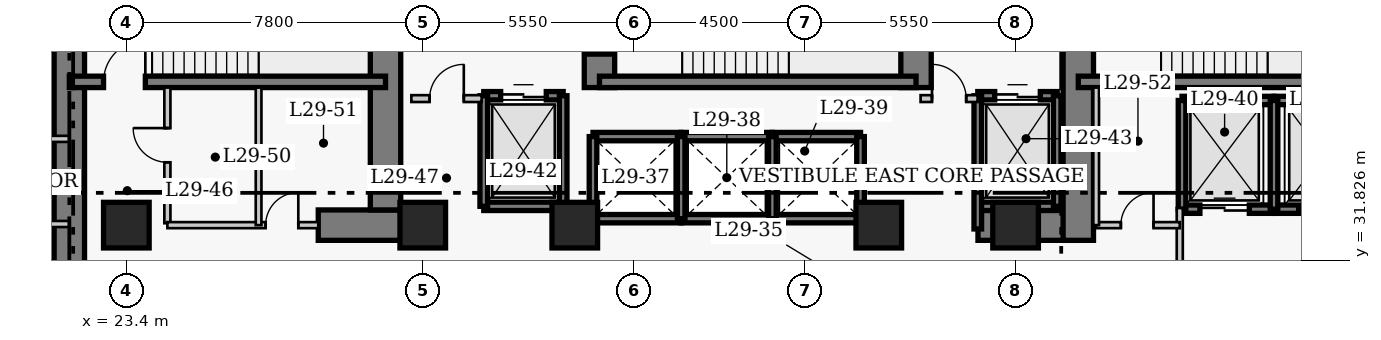
"""IFC4 building model, lengths in metres.
Left out: names, types, materials, properties, quantities, classifications, styles, units other than length and angle.
Written with IfcOpenShell. Run it as: python <this file> out.ifc"""

import sys

from ifc_helpers import new_model, si_unit, direction, frame, frame_2d, origin, origin_2d, place, context, subcontext, project, spatial, rectangle, extrude, element, fill, save


model = new_model("IFC4")
c1 = context("Model", 3, precision=1e-05, world=origin(), true_north=direction((0.0, 1.0)))
c2 = subcontext(c1, "Body", "Model", "MODEL_VIEW")
j1 = project(units=[si_unit("LENGTHUNIT", "METRE"), si_unit("PLANEANGLEUNIT", "RADIAN")], contexts=[c1])
p1 = place(None, origin())
s1 = spatial("IfcSite", under=j1, at=p1, CompositionType="ELEMENT")
p2 = place(p1, origin())
s2 = spatial("IfcBuilding", under=s1, at=p2, CompositionType="ELEMENT")
p3 = place(p2, frame((0.0, 0.0, 118.4)))
s3 = spatial("IfcBuildingStorey", under=s2, at=p3, CompositionType="ELEMENT", Elevation=118.4)
p4 = place(p3, frame((21.9, 27.05, 0.0), z_axis=(0.0, 0.0, 1.0), x_axis=(0.0, 1.0, 0.0)))
e1 = element("IfcWall", 1, at=p4, inside=s3, PredefinedType="SHEAR", context=c2, shape_type="SweptSolid", body=[
    extrude(rectangle(XDim=13.67, YDim=0.8, at=frame_2d((6.835, 0.0))), origin(), (0.0, 0.0, 1.0), 3.8),
])
p5 = place(p3, frame((28.45, 32.75, 0.0), z_axis=(0.0, 0.0, 1.0), x_axis=(1.0, 0.0, 0.0)))
e2 = element("IfcWall", 2, at=p5, inside=s3, PredefinedType="SHEAR", context=c2, shape_type="SweptSolid", body=[
    extrude(rectangle(XDim=2.4, YDim=0.8, at=frame_2d((1.2, 0.0))), origin(), (0.0, 0.0, 1.0), 3.8),
])
p6 = place(p3, frame((45.81, 32.75, 0.0), z_axis=(0.0, 0.0, 1.0), x_axis=(1.0, 0.0, 0.0)))
e3 = element("IfcWall", 3, at=p6, inside=s3, PredefinedType="SHEAR", context=c2, shape_type="SweptSolid", body=[
    extrude(rectangle(XDim=2.64, YDim=0.8, at=frame_2d((1.32, 0.0))), origin(), (0.0, 0.0, 1.0), 3.8),
])
p7 = place(p3, frame((30.22, 33.15, 0.0), z_axis=(0.0, 0.0, 1.0), x_axis=(0.0, 1.0, 0.0)))
e4 = element("IfcWall", 4, at=p7, inside=s3, PredefinedType="SHEAR", context=c2, shape_type="SweptSolid", body=[
    extrude(rectangle(XDim=7.17, YDim=0.8, at=frame_2d((3.585, 0.0))), origin(), (0.0, 0.0, 1.0), 3.8),
])
p8 = place(p3, frame((35.85, 36.37, 0.0), z_axis=(0.0, 0.0, 1.0), x_axis=(0.0, 1.0, 0.0)))
e5 = element("IfcWall", 5, at=p8, inside=s3, PredefinedType="SHEAR", context=c2, shape_type="SweptSolid", body=[
    extrude(rectangle(XDim=3.95, YDim=0.8, at=frame_2d((1.975, 0.0))), origin(), (0.0, 0.0, 1.0), 3.8),
])
p9 = place(p8, frame((0.88, 0.0, 0.0)))
e6 = element("IfcOpeningElement", 6, at=p9, cuts=e5, PredefinedType="OPENING", context=c2, shape_type="SweptSolid", body=[
    extrude(rectangle(XDim=1.1, YDim=2.15, at=frame_2d((0.55, 1.075))), frame((0.0, 0.41, 0.0), z_axis=(0.0, -1.0, 0.0), x_axis=(1.0, 0.0, 0.0)), (0.0, 0.0, 1.0), 0.82),
])
p10 = place(p3, frame((44.18, 36.37, 0.0), z_axis=(0.0, 0.0, 1.0), x_axis=(0.0, 1.0, 0.0)))
e7 = element("IfcWall", 7, at=p10, inside=s3, PredefinedType="SHEAR", context=c2, shape_type="SweptSolid", body=[
    extrude(rectangle(XDim=3.95, YDim=0.8, at=frame_2d((1.975, 0.0))), origin(), (0.0, 0.0, 1.0), 3.8),
])
p11 = place(p3, frame((48.45, 32.35, 0.0), z_axis=(0.0, 0.0, 1.0), x_axis=(0.0, 1.0, 0.0)))
e8 = element("IfcWall", 8, at=p11, inside=s3, PredefinedType="SHEAR", context=c2, shape_type="SweptSolid", body=[
    extrude(rectangle(XDim=7.97, YDim=0.8, at=frame_2d((3.985, 0.0))), origin(), (0.0, 0.0, 1.0), 3.8),
])
p12 = place(p11, frame((5.85, 0.0, 0.0)))
e9 = element("IfcOpeningElement", 9, at=p12, cuts=e8, PredefinedType="OPENING", context=c2, shape_type="SweptSolid", body=[
    extrude(rectangle(XDim=1.1, YDim=2.15, at=frame_2d((0.55, 1.075))), frame((0.0, 0.41, 0.0), z_axis=(0.0, -1.0, 0.0), x_axis=(1.0, 0.0, 0.0)), (0.0, 0.0, 1.0), 0.82),
])
p13 = place(p3, frame((21.9, 36.52, 0.0), z_axis=(0.0, 0.0, 1.0), x_axis=(1.0, 0.0, 0.0)))
e10 = element("IfcWall", 10, at=p13, inside=s3, PredefinedType="SHEAR", context=c2, shape_type="SweptSolid", body=[
    extrude(rectangle(XDim=8.32, YDim=0.3, at=frame_2d((4.16, 0.0))), origin(), (0.0, 0.0, 1.0), 3.8),
])
p14 = place(p13, frame((0.9, 0.0, 0.0)))
e11 = element("IfcOpeningElement", 11, at=p14, cuts=e10, PredefinedType="OPENING", context=c2, shape_type="SweptSolid", body=[
    extrude(rectangle(XDim=1.1, YDim=2.15, at=frame_2d((0.55, 1.075))), frame((0.0, 0.16, 0.0), z_axis=(0.0, -1.0, 0.0), x_axis=(1.0, 0.0, 0.0)), (0.0, 0.0, 1.0), 0.32),
])
p15 = place(p3, frame((35.85, 36.52, 0.0), z_axis=(0.0, 0.0, 1.0), x_axis=(1.0, 0.0, 0.0)))
e12 = element("IfcWall", 12, at=p15, inside=s3, PredefinedType="SHEAR", context=c2, shape_type="SweptSolid", body=[
    extrude(rectangle(XDim=8.33, YDim=0.3, at=frame_2d((4.165, 0.0))), origin(), (0.0, 0.0, 1.0), 3.8),
])
p16 = place(p3, frame((48.45, 36.52, 0.0), z_axis=(0.0, 0.0, 1.0), x_axis=(1.0, 0.0, 0.0)))
e13 = element("IfcWall", 13, at=p16, inside=s3, PredefinedType="SHEAR", context=c2, shape_type="SweptSolid", body=[
    extrude(rectangle(XDim=8.47, YDim=0.3, at=frame_2d((4.235, 0.0))), origin(), (0.0, 0.0, 1.0), 3.8),
])
for number, where, z_axis, x_axis in (
    (14, (23.4, 32.75, 0.0), (0.0, 0.0, 1.0), (1.0, 0.0, 0.0)),
    (15, (31.2, 32.75, 0.0), (0.0, 0.0, 1.0), (1.0, 0.0, 0.0)),
    (16, (35.2, 32.75, 0.0), (0.0, 0.0, 1.0), (1.0, 0.0, 0.0)),
    (17, (43.2, 32.75, 0.0), (0.0, 0.0, 1.0), (1.0, 0.0, 0.0)),
    (18, (46.8, 32.75, 0.0), (0.0, 0.0, 1.0), (1.0, 0.0, 0.0)),
):
    element("IfcColumn", number, at=place(p3, frame(where, z_axis=z_axis, x_axis=x_axis)), inside=s3, PredefinedType="COLUMN", context=c2, shape_type="SweptSolid", body=[
        extrude(rectangle(XDim=1.2, YDim=1.2, at=origin_2d()), origin(), (0.0, 0.0, 1.0), 3.8),
    ])
for number, where, z_axis, x_axis in (
    (19, (35.68, 35.08, 0.0), (0.0, 0.0, 1.0), (1.0, 0.0, 0.0)),
    (20, (35.68, 32.92, 0.0), (0.0, 0.0, 1.0), (1.0, 0.0, 0.0)),
):
    element("IfcWall", number, at=place(p3, frame(where, z_axis=z_axis, x_axis=x_axis)), inside=s3, PredefinedType="SHEAR", context=c2, shape_type="SweptSolid", body=[
        extrude(rectangle(XDim=2.32, YDim=0.22, at=frame_2d((1.16, 0.0))), origin(), (0.0, 0.0, 1.0), 3.8),
    ])
p17 = place(p3, frame((35.68, 32.92, 0.0), z_axis=(0.0, 0.0, 1.0), x_axis=(0.0, 1.0, 0.0)))
e21 = element("IfcWall", 21, at=p17, inside=s3, PredefinedType="SHEAR", context=c2, shape_type="SweptSolid", body=[
    extrude(rectangle(XDim=2.16, YDim=0.2, at=frame_2d((1.08, 0.0))), origin(), (0.0, 0.0, 1.0), 3.8),
])
for number, where, z_axis, x_axis in (
    (22, (38.0, 35.08, 0.0), (0.0, 0.0, 1.0), (1.0, 0.0, 0.0)),
    (23, (38.0, 32.92, 0.0), (0.0, 0.0, 1.0), (1.0, 0.0, 0.0)),
):
    element("IfcWall", number, at=place(p3, frame(where, z_axis=z_axis, x_axis=x_axis)), inside=s3, PredefinedType="SHEAR", context=c2, shape_type="SweptSolid", body=[
        extrude(rectangle(XDim=2.4, YDim=0.22, at=frame_2d((1.2, 0.0))), origin(), (0.0, 0.0, 1.0), 3.8),
    ])
p18 = place(p3, frame((38.0, 32.92, 0.0), z_axis=(0.0, 0.0, 1.0), x_axis=(0.0, 1.0, 0.0)))
e24 = element("IfcWall", 24, at=p18, inside=s3, PredefinedType="SHEAR", context=c2, shape_type="SweptSolid", body=[
    extrude(rectangle(XDim=2.16, YDim=0.2, at=frame_2d((1.08, 0.0))), origin(), (0.0, 0.0, 1.0), 3.8),
])
for number, where, z_axis, x_axis in (
    (25, (40.4, 35.08, 0.0), (0.0, 0.0, 1.0), (1.0, 0.0, 0.0)),
    (26, (40.4, 32.92, 0.0), (0.0, 0.0, 1.0), (1.0, 0.0, 0.0)),
):
    element("IfcWall", number, at=place(p3, frame(where, z_axis=z_axis, x_axis=x_axis)), inside=s3, PredefinedType="SHEAR", context=c2, shape_type="SweptSolid", body=[
        extrude(rectangle(XDim=2.32, YDim=0.22, at=frame_2d((1.16, 0.0))), origin(), (0.0, 0.0, 1.0), 3.8),
    ])
for number, where, z_axis, x_axis in (
    (27, (40.4, 32.92, 0.0), (0.0, 0.0, 1.0), (0.0, 1.0, 0.0)),
    (28, (42.72, 32.92, 0.0), (0.0, 0.0, 1.0), (0.0, 1.0, 0.0)),
):
    element("IfcWall", number, at=place(p3, frame(where, z_axis=z_axis, x_axis=x_axis)), inside=s3, PredefinedType="SHEAR", context=c2, shape_type="SweptSolid", body=[
        extrude(rectangle(XDim=2.16, YDim=0.2, at=frame_2d((1.08, 0.0))), origin(), (0.0, 0.0, 1.0), 3.8),
    ])
p19 = place(p3, frame((51.18, 36.03, 0.0), z_axis=(0.0, 0.0, 1.0), x_axis=(1.0, 0.0, 0.0)))
e29 = element("IfcWall", 29, at=p19, inside=s3, PredefinedType="SHEAR", context=c2, shape_type="SweptSolid", body=[
    extrude(rectangle(XDim=2.42, YDim=0.22, at=frame_2d((1.21, 0.0))), origin(), (0.0, 0.0, 1.0), 3.8),
])
p20 = place(p3, frame((51.18, 33.17, 0.0), z_axis=(0.0, 0.0, 1.0), x_axis=(1.0, 0.0, 0.0)))
e30 = element("IfcWall", 30, at=p20, inside=s3, PredefinedType="SHEAR", context=c2, shape_type="SweptSolid", body=[
    extrude(rectangle(XDim=2.42, YDim=0.22, at=frame_2d((1.21, 0.0))), origin(), (0.0, 0.0, 1.0), 3.8),
])
p21 = place(p20, frame((0.47, 0.0, 0.0)))
e31 = element("IfcOpeningElement", 31, at=p21, cuts=e30, PredefinedType="OPENING", context=c2, shape_type="SweptSolid", body=[
    extrude(rectangle(XDim=1.3, YDim=2.15, at=frame_2d((0.65, 1.075))), frame((0.0, 0.12, 0.0), z_axis=(0.0, -1.0, 0.0), x_axis=(1.0, 0.0, 0.0)), (0.0, 0.0, 1.0), 0.24),
])
p22 = place(p3, frame((51.18, 33.17, 0.0), z_axis=(0.0, 0.0, 1.0), x_axis=(0.0, 1.0, 0.0)))
e32 = element("IfcWall", 32, at=p22, inside=s3, PredefinedType="SHEAR", context=c2, shape_type="SweptSolid", body=[
    extrude(rectangle(XDim=2.86, YDim=0.2, at=frame_2d((1.43, 0.0))), origin(), (0.0, 0.0, 1.0), 3.8),
])
p23 = place(p3, frame((53.6, 36.03, 0.0), z_axis=(0.0, 0.0, 1.0), x_axis=(1.0, 0.0, 0.0)))
e33 = element("IfcWall", 33, at=p23, inside=s3, PredefinedType="SHEAR", context=c2, shape_type="SweptSolid", body=[
    extrude(rectangle(XDim=2.42, YDim=0.22, at=frame_2d((1.21, 0.0))), origin(), (0.0, 0.0, 1.0), 3.8),
])
p24 = place(p3, frame((53.6, 33.17, 0.0), z_axis=(0.0, 0.0, 1.0), x_axis=(1.0, 0.0, 0.0)))
e34 = element("IfcWall", 34, at=p24, inside=s3, PredefinedType="SHEAR", context=c2, shape_type="SweptSolid", body=[
    extrude(rectangle(XDim=2.42, YDim=0.22, at=frame_2d((1.21, 0.0))), origin(), (0.0, 0.0, 1.0), 3.8),
])
p25 = place(p24, frame((0.65, 0.0, 0.0)))
e35 = element("IfcOpeningElement", 35, at=p25, cuts=e34, PredefinedType="OPENING", context=c2, shape_type="SweptSolid", body=[
    extrude(rectangle(XDim=1.3, YDim=2.15, at=frame_2d((0.65, 1.075))), frame((0.0, 0.12, 0.0), z_axis=(0.0, -1.0, 0.0), x_axis=(1.0, 0.0, 0.0)), (0.0, 0.0, 1.0), 0.24),
])
p26 = place(p3, frame((53.6, 33.17, 0.0), z_axis=(0.0, 0.0, 1.0), x_axis=(0.0, 1.0, 0.0)))
e36 = element("IfcWall", 36, at=p26, inside=s3, PredefinedType="SHEAR", context=c2, shape_type="SweptSolid", body=[
    extrude(rectangle(XDim=2.86, YDim=0.2, at=frame_2d((1.43, 0.0))), origin(), (0.0, 0.0, 1.0), 3.8),
])
p27 = place(p3, frame((32.805, 36.155, 0.0), z_axis=(0.0, 0.0, 1.0), x_axis=(1.0, 0.0, 0.0)))
e37 = element("IfcWall", 37, at=p27, inside=s3, PredefinedType="SHEAR", context=c2, shape_type="SweptSolid", body=[
    extrude(rectangle(XDim=2.09, YDim=0.22, at=frame_2d((1.045, 0.0))), origin(), (0.0, 0.0, 1.0), 3.8),
])
p28 = place(p27, frame((0.445, 0.0, 0.0)))
e38 = element("IfcOpeningElement", 38, at=p28, cuts=e37, PredefinedType="OPENING", context=c2, shape_type="SweptSolid", body=[
    extrude(rectangle(XDim=1.2, YDim=2.15, at=frame_2d((0.6, 1.075))), frame((0.0, 0.12, 0.0), z_axis=(0.0, -1.0, 0.0), x_axis=(1.0, 0.0, 0.0)), (0.0, 0.0, 1.0), 0.24),
])
p29 = place(p3, frame((32.805, 33.245, 0.0), z_axis=(0.0, 0.0, 1.0), x_axis=(1.0, 0.0, 0.0)))
e39 = element("IfcWall", 39, at=p29, inside=s3, PredefinedType="SHEAR", context=c2, shape_type="SweptSolid", body=[
    extrude(rectangle(XDim=2.09, YDim=0.22, at=frame_2d((1.045, 0.0))), origin(), (0.0, 0.0, 1.0), 3.8),
])
for number, where, z_axis, x_axis in (
    (40, (32.805, 33.245, 0.0), (0.0, 0.0, 1.0), (0.0, 1.0, 0.0)),
    (41, (34.895, 33.245, 0.0), (0.0, 0.0, 1.0), (0.0, 1.0, 0.0)),
):
    element("IfcWall", number, at=place(p3, frame(where, z_axis=z_axis, x_axis=x_axis)), inside=s3, PredefinedType="SHEAR", context=c2, shape_type="SweptSolid", body=[
        extrude(rectangle(XDim=2.91, YDim=0.2, at=frame_2d((1.455, 0.0))), origin(), (0.0, 0.0, 1.0), 3.8),
    ])
p30 = place(p3, frame((45.805, 36.155, 0.0), z_axis=(0.0, 0.0, 1.0), x_axis=(1.0, 0.0, 0.0)))
e42 = element("IfcWall", 42, at=p30, inside=s3, PredefinedType="SHEAR", context=c2, shape_type="SweptSolid", body=[
    extrude(rectangle(XDim=2.09, YDim=0.22, at=frame_2d((1.045, 0.0))), origin(), (0.0, 0.0, 1.0), 3.8),
])
p31 = place(p30, frame((0.445, 0.0, 0.0)))
e43 = element("IfcOpeningElement", 43, at=p31, cuts=e42, PredefinedType="OPENING", context=c2, shape_type="SweptSolid", body=[
    extrude(rectangle(XDim=1.2, YDim=2.15, at=frame_2d((0.6, 1.075))), frame((0.0, 0.12, 0.0), z_axis=(0.0, -1.0, 0.0), x_axis=(1.0, 0.0, 0.0)), (0.0, 0.0, 1.0), 0.24),
])
p32 = place(p3, frame((45.805, 33.245, 0.0), z_axis=(0.0, 0.0, 1.0), x_axis=(1.0, 0.0, 0.0)))
e44 = element("IfcWall", 44, at=p32, inside=s3, PredefinedType="SHEAR", context=c2, shape_type="SweptSolid", body=[
    extrude(rectangle(XDim=2.09, YDim=0.22, at=frame_2d((1.045, 0.0))), origin(), (0.0, 0.0, 1.0), 3.8),
])
p33 = place(p3, frame((45.805, 32.65, 0.0), z_axis=(0.0, 0.0, 1.0), x_axis=(0.0, 1.0, 0.0)))
e45 = element("IfcWall", 45, at=p33, inside=s3, PredefinedType="SHEAR", context=c2, shape_type="SweptSolid", body=[
    extrude(rectangle(XDim=3.505, YDim=0.2, at=frame_2d((1.752, 0.0))), origin(), (0.0, 0.0, 1.0), 3.8),
])
p34 = place(p3, frame((47.895, 33.245, 0.0), z_axis=(0.0, 0.0, 1.0), x_axis=(0.0, 1.0, 0.0)))
e46 = element("IfcWall", 46, at=p34, inside=s3, PredefinedType="SHEAR", context=c2, shape_type="SweptSolid", body=[
    extrude(rectangle(XDim=2.91, YDim=0.2, at=frame_2d((1.455, 0.0))), origin(), (0.0, 0.0, 1.0), 3.8),
])
p35 = place(p3, frame((30.9, 36.08, 0.0), z_axis=(0.0, 0.0, 1.0), x_axis=(1.0, 0.0, 0.0)))
e47 = element("IfcWall", 47, at=p35, inside=s3, PredefinedType="PARTITIONING", context=c2, shape_type="SweptSolid", body=[
    extrude(rectangle(XDim=1.85, YDim=0.18, at=frame_2d((0.925, 0.0))), origin(), (0.0, 0.0, 1.0), 3.54),
])
p36 = place(p35, frame((0.48, 0.0, 0.0)))
e48 = element("IfcOpeningElement", 48, at=p36, cuts=e47, PredefinedType="OPENING", context=c2, shape_type="SweptSolid", body=[
    extrude(rectangle(XDim=0.9, YDim=2.15, at=frame_2d((0.45, 1.075))), frame((0.0, 0.1, 0.0), z_axis=(0.0, -1.0, 0.0), x_axis=(1.0, 0.0, 0.0)), (0.0, 0.0, 1.0), 0.2),
])
p37 = place(p3, frame((44.3, 36.08, 0.0), z_axis=(0.0, 0.0, 1.0), x_axis=(1.0, 0.0, 0.0)))
e49 = element("IfcWall", 49, at=p37, inside=s3, PredefinedType="PARTITIONING", context=c2, shape_type="SweptSolid", body=[
    extrude(rectangle(XDim=1.5, YDim=0.18, at=frame_2d((0.75, 0.0))), origin(), (0.0, 0.0, 1.0), 3.54),
])
p38 = place(p37, frame((0.3, 0.0, 0.0)))
e50 = element("IfcOpeningElement", 50, at=p38, cuts=e49, PredefinedType="OPENING", context=c2, shape_type="SweptSolid", body=[
    extrude(rectangle(XDim=0.9, YDim=2.15, at=frame_2d((0.45, 1.075))), frame((0.0, 0.1, 0.0), z_axis=(0.0, -1.0, 0.0), x_axis=(1.0, 0.0, 0.0)), (0.0, 0.0, 1.0), 0.2),
])
p39 = place(p3, frame((24.48, 32.8, 0.0), z_axis=(0.0, 0.0, 1.0), x_axis=(0.0, 1.0, 0.0)))
e51 = element("IfcWall", 51, at=p39, inside=s3, PredefinedType="PARTITIONING", context=c2, shape_type="SweptSolid", body=[
    extrude(rectangle(XDim=3.57, YDim=0.16, at=frame_2d((1.785, 0.0))), origin(), (0.0, 0.0, 1.0), 3.54),
])
p40 = place(p39, frame((1.604, 0.0, 0.0)))
e52 = element("IfcOpeningElement", 52, at=p40, cuts=e51, PredefinedType="OPENING", context=c2, shape_type="SweptSolid", body=[
    extrude(rectangle(XDim=0.9, YDim=2.1, at=frame_2d((0.45, 1.05))), frame((0.0, 0.09, 0.0), z_axis=(0.0, -1.0, 0.0), x_axis=(1.0, 0.0, 0.0)), (0.0, 0.0, 1.0), 0.18),
])
p41 = place(p3, frame((51.12, 29.5, 0.0), z_axis=(0.0, 0.0, 1.0), x_axis=(0.0, 1.0, 0.0)))
e53 = element("IfcWall", 53, at=p41, inside=s3, PredefinedType="PARTITIONING", context=c2, shape_type="SweptSolid", body=[
    extrude(rectangle(XDim=3.7, YDim=0.16, at=frame_2d((1.85, 0.0))), origin(), (0.0, 0.0, 1.0), 3.54),
])
p42 = place(p41, frame((0.9, 0.0, 0.0)))
e54 = element("IfcOpeningElement", 54, at=p42, cuts=e53, PredefinedType="OPENING", context=c2, shape_type="SweptSolid", body=[
    extrude(rectangle(XDim=1.1, YDim=2.15, at=frame_2d((0.55, 1.075))), frame((0.0, 0.09, 0.0), z_axis=(0.0, -1.0, 0.0), x_axis=(1.0, 0.0, 0.0)), (0.0, 0.0, 1.0), 0.18),
])
p43 = place(p3, frame((24.48, 32.75, 0.0), z_axis=(0.0, 0.0, 1.0), x_axis=(1.0, 0.0, 0.0)))
e55 = element("IfcWall", 55, at=p43, inside=s3, PredefinedType="PARTITIONING", context=c2, shape_type="SweptSolid", body=[
    extrude(rectangle(XDim=3.97, YDim=0.16, at=frame_2d((1.985, 0.0))), origin(), (0.0, 0.0, 1.0), 3.54),
])
p44 = place(p43, frame((2.585, 0.0, 0.0)))
e56 = element("IfcOpeningElement", 56, at=p44, cuts=e55, PredefinedType="OPENING", context=c2, shape_type="SweptSolid", body=[
    extrude(rectangle(XDim=0.86, YDim=2.05, at=frame_2d((0.43, 1.025))), frame((0.0, 0.09, 0.0), z_axis=(0.0, -1.0, 0.0), x_axis=(1.0, 0.0, 0.0)), (0.0, 0.0, 1.0), 0.18),
])
p45 = place(p3, frame((48.92, 32.75, 0.0), z_axis=(0.0, 0.0, 1.0), x_axis=(1.0, 0.0, 0.0)))
e57 = element("IfcWall", 57, at=p45, inside=s3, PredefinedType="PARTITIONING", context=c2, shape_type="SweptSolid", body=[
    extrude(rectangle(XDim=2.2, YDim=0.16, at=frame_2d((1.1, 0.0))), origin(), (0.0, 0.0, 1.0), 3.54),
])
p46 = place(p45, frame((0.65, 0.0, 0.0)))
e58 = element("IfcOpeningElement", 58, at=p46, cuts=e57, PredefinedType="OPENING", context=c2, shape_type="SweptSolid", body=[
    extrude(rectangle(XDim=0.86, YDim=2.05, at=frame_2d((0.43, 1.025))), frame((0.0, 0.09, 0.0), z_axis=(0.0, -1.0, 0.0), x_axis=(1.0, 0.0, 0.0)), (0.0, 0.0, 1.0), 0.18),
])
for number, where, z_axis, x_axis in (
    (59, (48.92, 32.75, 0.0), (0.0, 0.0, 1.0), (0.0, 1.0, 0.0)),
    (60, (26.88, 32.75, 0.0), (0.0, 0.0, 1.0), (0.0, 1.0, 0.0)),
):
    element("IfcWall", number, at=place(p3, frame(where, z_axis=z_axis, x_axis=x_axis)), inside=s3, PredefinedType="PARTITIONING", context=c2, shape_type="SweptSolid", body=[
        extrude(rectangle(XDim=3.62, YDim=0.15, at=frame_2d((1.81, 0.0))), origin(), (0.0, 0.0, 1.0), 3.54),
    ])
for number, where, z_axis, x_axis in (
    (61, (19.96, 35.02, 0.0), (0.0, 0.0, 1.0), (1.0, 0.0, 0.0)),
    (62, (19.96, 32.78, 0.0), (0.0, 0.0, 1.0), (1.0, 0.0, 0.0)),
):
    element("IfcWall", number, at=place(p3, frame(where, z_axis=z_axis, x_axis=x_axis)), inside=s3, PredefinedType="PARTITIONING", context=c2, shape_type="SweptSolid", body=[
        extrude(rectangle(XDim=1.94, YDim=0.16, at=frame_2d((0.97, 0.0))), origin(), (0.0, 0.0, 1.0), 3.54),
    ])
p47 = place(p21, origin())
e63 = element("IfcDoor", 63, at=p47, inside=s3, OperationType="DOUBLE_DOOR_SLIDING", PredefinedType="DOOR", context=c2, shape_type="SweptSolid", body=[
    extrude(rectangle(XDim=1.3, YDim=2.15, at=frame_2d((0.65, 1.075))), frame((0.0, 0.025, 0.0), z_axis=(0.0, -1.0, 0.0), x_axis=(1.0, 0.0, 0.0)), (0.0, 0.0, 1.0), 0.05),
])
fill(e31, e63)
p48 = place(p25, origin())
e64 = element("IfcDoor", 64, at=p48, inside=s3, OperationType="DOUBLE_DOOR_SLIDING", PredefinedType="DOOR", context=c2, shape_type="SweptSolid", body=[
    extrude(rectangle(XDim=1.3, YDim=2.15, at=frame_2d((0.65, 1.075))), frame((0.0, 0.025, 0.0), z_axis=(0.0, -1.0, 0.0), x_axis=(1.0, 0.0, 0.0)), (0.0, 0.0, 1.0), 0.05),
])
fill(e35, e64)
p49 = place(p28, origin())
e65 = element("IfcDoor", 65, at=p49, inside=s3, OperationType="DOUBLE_DOOR_SLIDING", PredefinedType="DOOR", context=c2, shape_type="SweptSolid", body=[
    extrude(rectangle(XDim=1.2, YDim=2.15, at=frame_2d((0.6, 1.075))), frame((0.0, 0.025, 0.0), z_axis=(0.0, -1.0, 0.0), x_axis=(1.0, 0.0, 0.0)), (0.0, 0.0, 1.0), 0.05),
])
fill(e38, e65)
p50 = place(p31, origin())
e66 = element("IfcDoor", 66, at=p50, inside=s3, OperationType="DOUBLE_DOOR_SLIDING", PredefinedType="DOOR", context=c2, shape_type="SweptSolid", body=[
    extrude(rectangle(XDim=1.2, YDim=2.15, at=frame_2d((0.6, 1.075))), frame((0.0, 0.025, 0.0), z_axis=(0.0, -1.0, 0.0), x_axis=(1.0, 0.0, 0.0)), (0.0, 0.0, 1.0), 0.05),
])
fill(e43, e66)
p51 = place(p36, origin())
e67 = element("IfcDoor", 67, at=p51, inside=s3, OperationType="SINGLE_SWING_RIGHT", PredefinedType="DOOR", context=c2, shape_type="SweptSolid", body=[
    extrude(rectangle(XDim=0.9, YDim=2.15, at=frame_2d((0.45, 1.075))), frame((0.0, 0.025, 0.0), z_axis=(0.0, -1.0, 0.0), x_axis=(1.0, 0.0, 0.0)), (0.0, 0.0, 1.0), 0.05),
])
fill(e48, e67)
p52 = place(p38, origin())
e68 = element("IfcDoor", 68, at=p52, inside=s3, OperationType="SINGLE_SWING_LEFT", PredefinedType="DOOR", context=c2, shape_type="SweptSolid", body=[
    extrude(rectangle(XDim=0.9, YDim=2.15, at=frame_2d((0.45, 1.075))), frame((0.0, 0.025, 0.0), z_axis=(0.0, -1.0, 0.0), x_axis=(1.0, 0.0, 0.0)), (0.0, 0.0, 1.0), 0.05),
])
fill(e50, e68)
p53 = place(p40, origin())
e69 = element("IfcDoor", 69, at=p53, inside=s3, OperationType="SINGLE_SWING_RIGHT", PredefinedType="DOOR", context=c2, shape_type="SweptSolid", body=[
    extrude(rectangle(XDim=0.9, YDim=2.1, at=frame_2d((0.45, 1.05))), frame((0.0, 0.025, 0.0), z_axis=(0.0, -1.0, 0.0), x_axis=(1.0, 0.0, 0.0)), (0.0, 0.0, 1.0), 0.05),
])
fill(e52, e69)
p54 = place(p44, origin())
e70 = element("IfcDoor", 70, at=p54, inside=s3, OperationType="SINGLE_SWING_RIGHT", PredefinedType="DOOR", context=c2, shape_type="SweptSolid", body=[
    extrude(rectangle(XDim=0.86, YDim=2.05, at=frame_2d((0.43, 1.025))), frame((0.0, 0.025, 0.0), z_axis=(0.0, -1.0, 0.0), x_axis=(1.0, 0.0, 0.0)), (0.0, 0.0, 1.0), 0.05),
])
fill(e56, e70)
p55 = place(p46, origin())
e71 = element("IfcDoor", 71, at=p55, inside=s3, OperationType="SINGLE_SWING_RIGHT", PredefinedType="DOOR", context=c2, shape_type="SweptSolid", body=[
    extrude(rectangle(XDim=0.86, YDim=2.05, at=frame_2d((0.43, 1.025))), frame((0.0, 0.025, 0.0), z_axis=(0.0, -1.0, 0.0), x_axis=(1.0, 0.0, 0.0)), (0.0, 0.0, 1.0), 0.05),
])
fill(e58, e71)
p56 = place(p14, origin())
e72 = element("IfcDoor", 72, at=p56, inside=s3, OperationType="SINGLE_SWING_RIGHT", PredefinedType="DOOR", context=c2, shape_type="SweptSolid", body=[
    extrude(rectangle(XDim=1.1, YDim=2.15, at=frame_2d((0.55, 1.075))), frame((0.0, 0.025, 0.0), z_axis=(0.0, -1.0, 0.0), x_axis=(1.0, 0.0, 0.0)), (0.0, 0.0, 1.0), 0.05),
])
fill(e11, e72)
p57 = place(p9, origin())
e73 = element("IfcDoor", 73, at=p57, inside=s3, OperationType="SINGLE_SWING_RIGHT", PredefinedType="DOOR", context=c2, shape_type="SweptSolid", body=[
    extrude(rectangle(XDim=1.1, YDim=2.15, at=frame_2d((0.55, 1.075))), frame((0.0, 0.025, 0.0), z_axis=(0.0, -1.0, 0.0), x_axis=(1.0, 0.0, 0.0)), (0.0, 0.0, 1.0), 0.05),
])
fill(e6, e73)
save(model, sys.argv[1])
